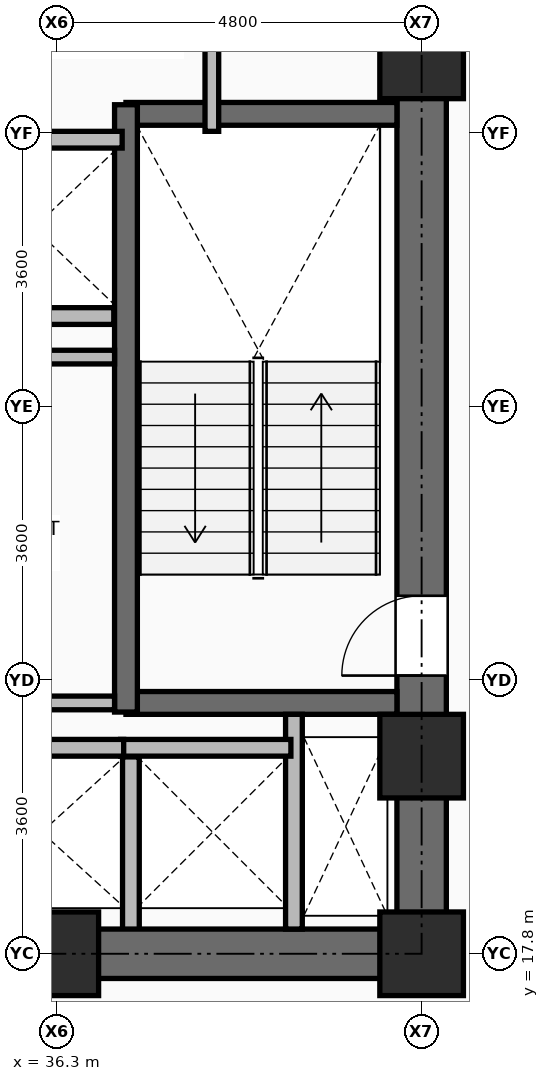
"""IFC4 building model, lengths in metres.
Left out: names, types, materials, properties, quantities, classifications, styles, units other than length and angle.
Written with IfcOpenShell. Run it as: python <this file> out.ifc"""

import sys

from ifc_helpers import new_model, si_unit, direction, frame, frame_2d, origin, origin_2d, place, context, subcontext, project, spatial, rectangle, extrude, element, fill, save


model = new_model("IFC4")
c1 = context("Model", 3, precision=1e-05, world=origin(), true_north=direction((0.0, 1.0)))
c2 = subcontext(c1, "Body", "Model", "MODEL_VIEW")
j1 = project(units=[si_unit("LENGTHUNIT", "METRE"), si_unit("PLANEANGLEUNIT", "RADIAN")], contexts=[c1])
p1 = place(None, origin())
s1 = spatial("IfcSite", under=j1, at=p1, CompositionType="ELEMENT")
p2 = place(p1, origin())
s2 = spatial("IfcBuilding", under=s1, at=p2, CompositionType="ELEMENT")
p3 = place(p2, frame((0.0, 0.0, 64.5)))
s3 = spatial("IfcBuildingStorey", under=s2, at=p3, CompositionType="ELEMENT", Elevation=64.5)
for number, where, z_axis, x_axis in (
    (1, (36.3, 17.8, 0.0), (0.0, 0.0, 1.0), (1.0, 0.0, 0.0)),
    (2, (41.1, 17.8, 0.0), (0.0, 0.0, 1.0), (1.0, 0.0, 0.0)),
    (3, (41.1, 20.4, 0.0), (0.0, 0.0, 1.0), (1.0, 0.0, 0.0)),
    (4, (41.1, 29.6, 0.0), (0.0, 0.0, 1.0), (1.0, 0.0, 0.0)),
):
    element("IfcColumn", number, at=place(p3, frame(where, z_axis=z_axis, x_axis=x_axis)), inside=s3, PredefinedType="COLUMN", context=c2, shape_type="SweptSolid", body=[
        extrude(rectangle(XDim=1.1, YDim=1.1, at=origin_2d()), origin(), (0.0, 0.0, 1.0), 3.75),
    ])
p4 = place(p3, frame((37.275, 18.08, 0.0), z_axis=(0.0, 0.0, 1.0), x_axis=(0.0, 1.0, 0.0)))
e5 = element("IfcWall", 5, at=p4, inside=s3, PredefinedType="PARTITIONING", context=c2, shape_type="SweptSolid", body=[
    extrude(rectangle(XDim=2.31, YDim=0.22, at=frame_2d((1.155, 0.0))), origin(), (0.0, 0.0, 1.0), 3.545),
])
p5 = place(p3, frame((34.91, 26.19, 0.0), z_axis=(0.0, 0.0, 1.0), x_axis=(1.0, 0.0, 0.0)))
e6 = element("IfcWall", 6, at=p5, inside=s3, PredefinedType="PARTITIONING", context=c2, shape_type="SweptSolid", body=[
    extrude(rectangle(XDim=2.14, YDim=0.22, at=frame_2d((1.07, 0.0))), origin(), (0.0, 0.0, 1.0), 3.545),
])
p6 = place(p3, frame((34.95, 17.8, 0.0), z_axis=(0.0, 0.0, 1.0), x_axis=(1.0, 0.0, 0.0)))
e7 = element("IfcWall", 7, at=p6, inside=s3, PredefinedType="SHEAR", context=c2, shape_type="SweptSolid", body=[
    extrude(rectangle(XDim=6.475, YDim=0.65, at=frame_2d((3.238, 0.0))), origin(), (0.0, 0.0, 1.0), 3.57),
])
p7 = place(p3, frame((41.1, 18.125, 0.0), z_axis=(0.0, 0.0, 1.0), x_axis=(0.0, 1.0, 0.0)))
e8 = element("IfcWall", 8, at=p7, inside=s3, PredefinedType="SHEAR", context=c2, shape_type="SweptSolid", body=[
    extrude(rectangle(XDim=14.0, YDim=0.65, at=frame_2d((7.0, 0.0))), origin(), (0.0, 0.0, 1.0), 3.57),
])
p8 = place(p7, frame((3.335, 0.0, 0.0)))
e9 = element("IfcOpeningElement", 9, at=p8, cuts=e8, PredefinedType="OPENING", context=c2, shape_type="SweptSolid", body=[
    extrude(rectangle(XDim=1.05, YDim=2.1, at=frame_2d((0.525, 1.05))), frame((0.0, 0.335, 0.0), z_axis=(0.0, -1.0, 0.0), x_axis=(1.0, 0.0, 0.0)), (0.0, 0.0, 1.0), 0.67),
])
for number, where, z_axis, x_axis in (
    (10, (37.21, 21.1, 0.0), (0.0, 0.0, 1.0), (1.0, 0.0, 0.0)),
    (11, (37.21, 28.85, 0.0), (0.0, 0.0, 1.0), (1.0, 0.0, 0.0)),
):
    element("IfcWall", number, at=place(p3, frame(where, z_axis=z_axis, x_axis=x_axis)), inside=s3, PredefinedType="SHEAR", context=c2, shape_type="SweptSolid", body=[
        extrude(rectangle(XDim=3.565, YDim=0.3, at=frame_2d((1.782, 0.0))), origin(), (0.0, 0.0, 1.0), 3.57),
    ])
p9 = place(p3, frame((37.21, 20.98, 0.0), z_axis=(0.0, 0.0, 1.0), x_axis=(0.0, 1.0, 0.0)))
e12 = element("IfcWall", 12, at=p9, inside=s3, PredefinedType="SHEAR", context=c2, shape_type="SweptSolid", body=[
    extrude(rectangle(XDim=7.99, YDim=0.3, at=frame_2d((3.995, 0.0))), origin(), (0.0, 0.0, 1.0), 3.57),
])
p10 = place(p3, frame((39.42, 18.125, 0.0), z_axis=(0.0, 0.0, 1.0), x_axis=(0.0, 1.0, 0.0)))
e13 = element("IfcWall", 13, at=p10, inside=s3, PredefinedType="PARTITIONING", context=c2, shape_type="SweptSolid", body=[
    extrude(rectangle(XDim=2.825, YDim=0.22, at=frame_2d((1.413, 0.0))), origin(), (0.0, 0.0, 1.0), 3.55),
])
for number, where, z_axis, x_axis in (
    (14, (37.14, 20.51, 0.0), (0.0, 0.0, 1.0), (1.0, 0.0, 0.0)),
    (15, (34.94, 20.51, 0.0), (0.0, 0.0, 1.0), (1.0, 0.0, 0.0)),
):
    element("IfcWall", number, at=place(p3, frame(where, z_axis=z_axis, x_axis=x_axis)), inside=s3, PredefinedType="PARTITIONING", context=c2, shape_type="SweptSolid", body=[
        extrude(rectangle(XDim=2.24, YDim=0.22, at=frame_2d((1.12, 0.0))), origin(), (0.0, 0.0, 1.0), 3.55),
    ])
p11 = place(p3, frame((35.56, 28.51, 0.0), z_axis=(0.0, 0.0, 1.0), x_axis=(1.0, 0.0, 0.0)))
e16 = element("IfcWall", 16, at=p11, inside=s3, PredefinedType="PARTITIONING", context=c2, shape_type="SweptSolid", body=[
    extrude(rectangle(XDim=1.6, YDim=0.22, at=frame_2d((0.8, 0.0))), origin(), (0.0, 0.0, 1.0), 3.55),
])
p12 = place(p3, frame((34.98, 21.1, 0.0), z_axis=(0.0, 0.0, 1.0), x_axis=(1.0, 0.0, 0.0)))
e17 = element("IfcWall", 17, at=p12, inside=s3, PredefinedType="PARTITIONING", context=c2, shape_type="SweptSolid", body=[
    extrude(rectangle(XDim=2.08, YDim=0.18, at=frame_2d((1.04, 0.0))), origin(), (0.0, 0.0, 1.0), 3.55),
])
p13 = place(p3, frame((34.72, 25.65, 0.0), z_axis=(0.0, 0.0, 1.0), x_axis=(1.0, 0.0, 0.0)))
e18 = element("IfcWall", 18, at=p13, inside=s3, PredefinedType="PARTITIONING", context=c2, shape_type="SweptSolid", body=[
    extrude(rectangle(XDim=2.34, YDim=0.18, at=frame_2d((1.17, 0.0))), origin(), (0.0, 0.0, 1.0), 3.55),
])
p14 = place(p3, frame((38.34, 28.62, 0.0), z_axis=(0.0, 0.0, 1.0), x_axis=(0.0, 1.0, 0.0)))
e19 = element("IfcWall", 19, at=p14, inside=s3, PredefinedType="PARTITIONING", context=c2, shape_type="SweptSolid", body=[
    extrude(rectangle(XDim=3.505, YDim=0.18, at=frame_2d((1.752, 0.0))), origin(), (0.0, 0.0, 1.0), 3.55),
])
p15 = place(p8, origin())
e20 = element("IfcDoor", 20, at=p15, inside=s3, OperationType="SINGLE_SWING_LEFT", PredefinedType="DOOR", context=c2, shape_type="SweptSolid", body=[
    extrude(rectangle(XDim=1.05, YDim=2.1, at=frame_2d((0.525, 1.05))), frame((0.0, 0.025, 0.0), z_axis=(0.0, -1.0, 0.0), x_axis=(1.0, 0.0, 0.0)), (0.0, 0.0, 1.0), 0.05),
])
fill(e9, e20)
save(model, sys.argv[1])
